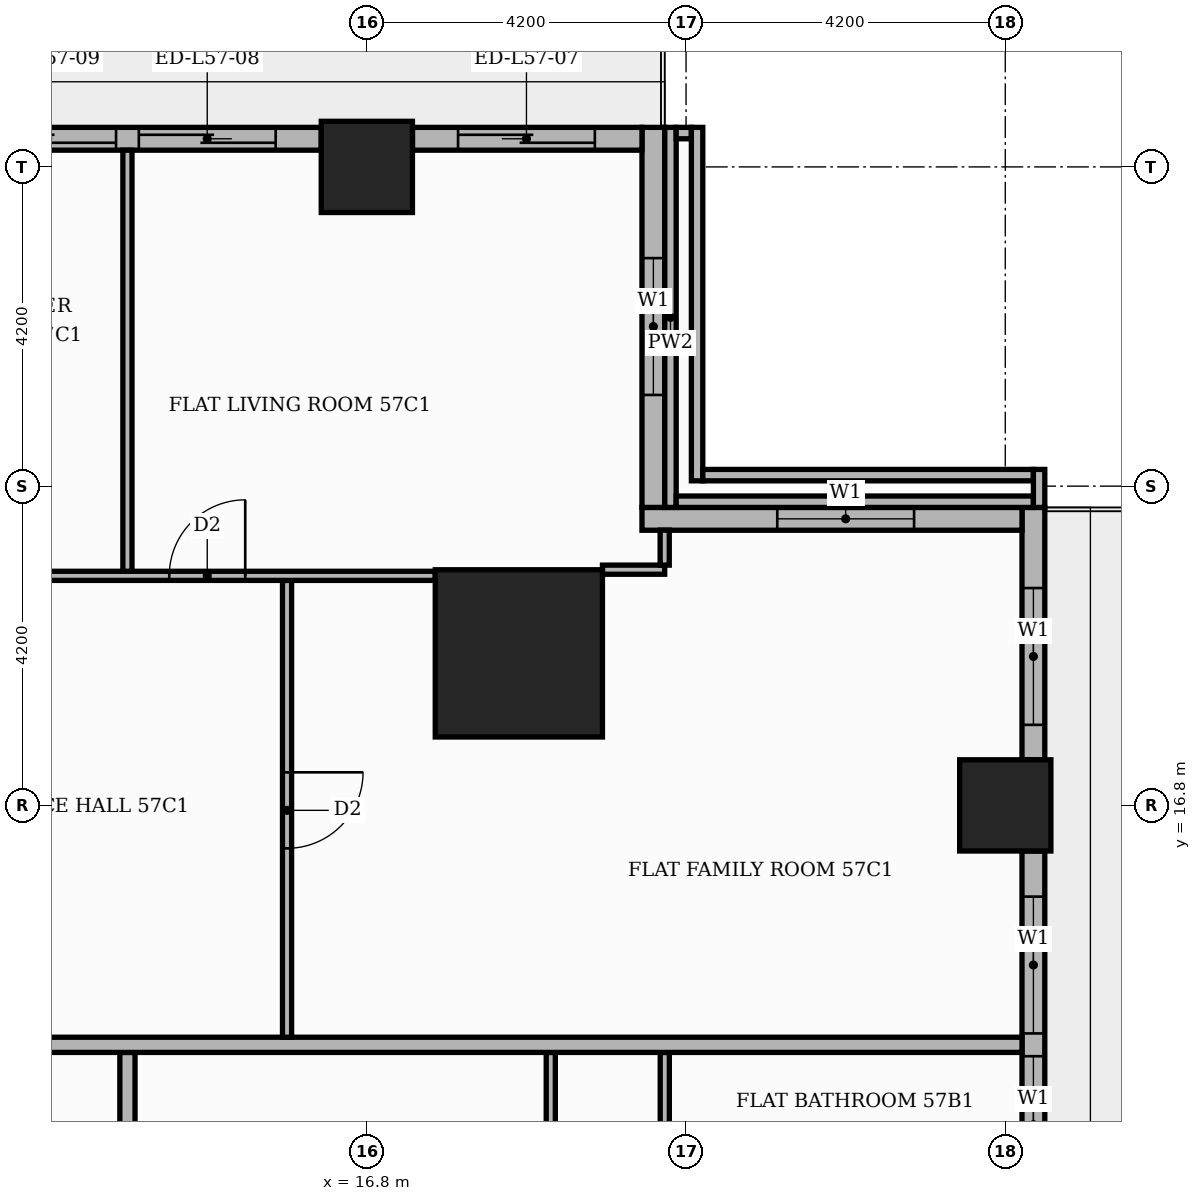
"""IFC4 building model, lengths in metres.
Left out: names, types, materials, properties, quantities, classifications, styles, units other than length and angle.
Written with IfcOpenShell. Run it as: python <this file> out.ifc"""

import sys

from ifc_helpers import new_model, si_unit, direction, frame, frame_2d, origin, origin_2d, place, context, subcontext, project, spatial, rectangle, extrude, element, fill, save


model = new_model("IFC4")
c1 = context("Model", 3, precision=1e-05, world=origin(), true_north=direction((0.0, 1.0)))
c2 = subcontext(c1, "Body", "Model", "MODEL_VIEW")
j1 = project(units=[si_unit("LENGTHUNIT", "METRE"), si_unit("PLANEANGLEUNIT", "RADIAN")], contexts=[c1])
p1 = place(None, origin())
s1 = spatial("IfcSite", under=j1, at=p1, CompositionType="ELEMENT")
p2 = place(p1, origin())
s2 = spatial("IfcBuilding", under=s1, at=p2, CompositionType="ELEMENT")
p3 = place(p2, frame((0.0, 0.0, 240.6)))
s3 = spatial("IfcBuildingStorey", under=s2, at=p3, CompositionType="ELEMENT", Elevation=240.6)
p4 = place(p3, frame((18.8, 18.8, 0.0), z_axis=(0.0, 0.0, 1.0), x_axis=(1.0, 0.0, 0.0)))
e1 = element("IfcColumn", 1, at=p4, inside=s3, PredefinedType="COLUMN", context=c2, shape_type="SweptSolid", body=[
    extrude(rectangle(XDim=2.2, YDim=2.2, at=origin_2d()), origin(), (0.0, 0.0, 1.0), 3.9),
])
for number, where, z_axis, x_axis in (
    (2, (25.2, 16.8, 0.0), (0.0, 0.0, 1.0), (1.0, 0.0, 0.0)),
    (3, (16.8, 25.2, 0.0), (0.0, 0.0, 1.0), (1.0, 0.0, 0.0)),
):
    element("IfcColumn", number, at=place(p3, frame(where, z_axis=z_axis, x_axis=x_axis)), inside=s3, PredefinedType="COLUMN", context=c2, shape_type="SweptSolid", body=[
        extrude(rectangle(XDim=1.2, YDim=1.2, at=origin_2d()), origin(), (0.0, 0.0, 1.0), 3.9),
    ])
p5 = place(p3, frame((25.57, 9.0, 0.0), z_axis=(0.0, 0.0, 1.0), x_axis=(0.0, 1.0, 0.0)))
e4 = element("IfcWall", 4, at=p5, inside=s3, PredefinedType="STANDARD", context=c2, shape_type="SweptSolid", body=[
    extrude(rectangle(XDim=7.2, YDim=0.3, at=frame_2d((3.6, 0.0))), origin(), (0.0, 0.0, 1.0), 3.48),
])
p6 = place(p5, frame((0.6, 0.0, 0.9)))
e5 = element("IfcOpeningElement", 5, at=p6, cuts=e4, PredefinedType="OPENING", context=c2, shape_type="SweptSolid", body=[
    extrude(rectangle(XDim=1.8, YDim=2.1, at=frame_2d((0.9, 1.05))), frame((0.0, 0.16, 0.0), z_axis=(0.0, -1.0, 0.0), x_axis=(1.0, 0.0, 0.0)), (0.0, 0.0, 1.0), 0.32),
])
p7 = place(p5, frame((2.7, 0.0, 0.9)))
e6 = element("IfcOpeningElement", 6, at=p7, cuts=e4, PredefinedType="OPENING", context=c2, shape_type="SweptSolid", body=[
    extrude(rectangle(XDim=1.8, YDim=2.1, at=frame_2d((0.9, 1.05))), frame((0.0, 0.16, 0.0), z_axis=(0.0, -1.0, 0.0), x_axis=(1.0, 0.0, 0.0)), (0.0, 0.0, 1.0), 0.32),
])
p8 = place(p5, frame((4.8, 0.0, 0.9)))
e7 = element("IfcOpeningElement", 7, at=p8, cuts=e4, PredefinedType="OPENING", context=c2, shape_type="SweptSolid", body=[
    extrude(rectangle(XDim=1.8, YDim=2.1, at=frame_2d((0.9, 1.05))), frame((0.0, 0.16, 0.0), z_axis=(0.0, -1.0, 0.0), x_axis=(1.0, 0.0, 0.0)), (0.0, 0.0, 1.0), 0.32),
])
p9 = place(p3, frame((25.57, 17.4, 0.0), z_axis=(0.0, 0.0, 1.0), x_axis=(0.0, 1.0, 0.0)))
e8 = element("IfcWall", 8, at=p9, inside=s3, PredefinedType="STANDARD", context=c2, shape_type="SweptSolid", body=[
    extrude(rectangle(XDim=3.32, YDim=0.3, at=frame_2d((1.66, 0.0))), origin(), (0.0, 0.0, 1.0), 3.48),
])
p10 = place(p9, frame((0.459, 0.0, 0.9)))
e9 = element("IfcOpeningElement", 9, at=p10, cuts=e8, PredefinedType="OPENING", context=c2, shape_type="SweptSolid", body=[
    extrude(rectangle(XDim=1.8, YDim=2.1, at=frame_2d((0.9, 1.05))), frame((0.0, 0.16, 0.0), z_axis=(0.0, -1.0, 0.0), x_axis=(1.0, 0.0, 0.0)), (0.0, 0.0, 1.0), 0.32),
])
p11 = place(p3, frame((25.42, 20.57, 0.0), z_axis=(0.0, 0.0, 1.0), x_axis=(-1.0, 0.0, 0.0)))
e10 = element("IfcWall", 10, at=p11, inside=s3, PredefinedType="STANDARD", context=c2, shape_type="SweptSolid", body=[
    extrude(rectangle(XDim=5.0, YDim=0.3, at=frame_2d((2.5, 0.0))), origin(), (0.0, 0.0, 1.0), 3.48),
])
p12 = place(p11, frame((1.42, 0.0, 0.9)))
e11 = element("IfcOpeningElement", 11, at=p12, cuts=e10, PredefinedType="OPENING", context=c2, shape_type="SweptSolid", body=[
    extrude(rectangle(XDim=1.8, YDim=2.1, at=frame_2d((0.9, 1.05))), frame((0.0, 0.16, 0.0), z_axis=(0.0, -1.0, 0.0), x_axis=(1.0, 0.0, 0.0)), (0.0, 0.0, 1.0), 0.32),
])
p13 = place(p3, frame((20.57, 20.72, 0.0), z_axis=(0.0, 0.0, 1.0), x_axis=(0.0, 1.0, 0.0)))
e12 = element("IfcWall", 12, at=p13, inside=s3, PredefinedType="STANDARD", context=c2, shape_type="SweptSolid", body=[
    extrude(rectangle(XDim=5.0, YDim=0.3, at=frame_2d((2.5, 0.0))), origin(), (0.0, 0.0, 1.0), 3.48),
])
p14 = place(p13, frame((1.48, 0.0, 0.9)))
e13 = element("IfcOpeningElement", 13, at=p14, cuts=e12, PredefinedType="OPENING", context=c2, shape_type="SweptSolid", body=[
    extrude(rectangle(XDim=1.8, YDim=2.1, at=frame_2d((0.9, 1.05))), frame((0.0, 0.16, 0.0), z_axis=(0.0, -1.0, 0.0), x_axis=(1.0, 0.0, 0.0)), (0.0, 0.0, 1.0), 0.32),
])
p15 = place(p3, frame((20.42, 25.57, 0.0), z_axis=(0.0, 0.0, 1.0), x_axis=(-1.0, 0.0, 0.0)))
e14 = element("IfcWall", 14, at=p15, inside=s3, PredefinedType="STANDARD", context=c2, shape_type="SweptSolid", body=[
    extrude(rectangle(XDim=3.02, YDim=0.3, at=frame_2d((1.51, 0.0))), origin(), (0.0, 0.0, 1.0), 3.48),
])
p16 = place(p15, frame((0.62, 0.0, 0.0)))
e15 = element("IfcOpeningElement", 15, at=p16, cuts=e14, PredefinedType="OPENING", context=c2, shape_type="SweptSolid", body=[
    extrude(rectangle(XDim=1.8, YDim=2.4, at=frame_2d((0.9, 1.2))), frame((0.0, 0.16, 0.0), z_axis=(0.0, -1.0, 0.0), x_axis=(1.0, 0.0, 0.0)), (0.0, 0.0, 1.0), 0.32),
])
p17 = place(p3, frame((16.2, 25.57, 0.0), z_axis=(0.0, 0.0, 1.0), x_axis=(-1.0, 0.0, 0.0)))
e16 = element("IfcWall", 16, at=p17, inside=s3, PredefinedType="STANDARD", context=c2, shape_type="SweptSolid", body=[
    extrude(rectangle(XDim=7.2, YDim=0.3, at=frame_2d((3.6, 0.0))), origin(), (0.0, 0.0, 1.0), 3.48),
])
p18 = place(p17, frame((0.6, 0.0, 0.0)))
e17 = element("IfcOpeningElement", 17, at=p18, cuts=e16, PredefinedType="OPENING", context=c2, shape_type="SweptSolid", body=[
    extrude(rectangle(XDim=1.8, YDim=2.4, at=frame_2d((0.9, 1.2))), frame((0.0, 0.16, 0.0), z_axis=(0.0, -1.0, 0.0), x_axis=(1.0, 0.0, 0.0)), (0.0, 0.0, 1.0), 0.32),
])
p19 = place(p17, frame((2.7, 0.0, 0.0)))
e18 = element("IfcOpeningElement", 18, at=p19, cuts=e16, PredefinedType="OPENING", context=c2, shape_type="SweptSolid", body=[
    extrude(rectangle(XDim=1.8, YDim=2.4, at=frame_2d((0.9, 1.2))), frame((0.0, 0.16, 0.0), z_axis=(0.0, -1.0, 0.0), x_axis=(1.0, 0.0, 0.0)), (0.0, 0.0, 1.0), 0.32),
])
p20 = place(p17, frame((4.8, 0.0, 0.9)))
e19 = element("IfcOpeningElement", 19, at=p20, cuts=e16, PredefinedType="OPENING", context=c2, shape_type="SweptSolid", body=[
    extrude(rectangle(XDim=1.8, YDim=2.1, at=frame_2d((0.9, 1.05))), frame((0.0, 0.16, 0.0), z_axis=(0.0, -1.0, 0.0), x_axis=(1.0, 0.0, 0.0)), (0.0, 0.0, 1.0), 0.32),
])
p21 = place(p3, frame((20.795, 20.72, 0.0), z_axis=(0.0, 0.0, 1.0), x_axis=(0.0, 1.0, 0.0)))
e20 = element("IfcWall", 20, at=p21, inside=s3, PredefinedType="PARAPET", context=c2, shape_type="SweptSolid", body=[
    extrude(rectangle(XDim=5.0, YDim=0.15, at=frame_2d((2.5, 0.0))), origin(), (0.0, 0.0, 1.0), 1.1),
])
p22 = place(p3, frame((20.87, 25.645, 0.0), z_axis=(0.0, 0.0, 1.0), x_axis=(1.0, 0.0, 0.0)))
e21 = element("IfcWall", 21, at=p22, inside=s3, PredefinedType="PARAPET", context=c2, shape_type="SweptSolid", body=[
    extrude(rectangle(XDim=0.2, YDim=0.15, at=frame_2d((0.1, 0.0))), origin(), (0.0, 0.0, 1.0), 1.1),
])
p23 = place(p3, frame((20.87, 20.795, 0.0), z_axis=(0.0, 0.0, 1.0), x_axis=(1.0, 0.0, 0.0)))
e22 = element("IfcWall", 22, at=p23, inside=s3, PredefinedType="PARAPET", context=c2, shape_type="SweptSolid", body=[
    extrude(rectangle(XDim=4.7, YDim=0.15, at=frame_2d((2.35, 0.0))), origin(), (0.0, 0.0, 1.0), 1.1),
])
p24 = place(p3, frame((21.145, 21.07, 0.0), z_axis=(0.0, 0.0, 1.0), x_axis=(0.0, 1.0, 0.0)))
e23 = element("IfcWall", 23, at=p24, inside=s3, PredefinedType="PARAPET", context=c2, shape_type="SweptSolid", body=[
    extrude(rectangle(XDim=4.65, YDim=0.15, at=frame_2d((2.325, 0.0))), origin(), (0.0, 0.0, 1.0), 1.1),
])
p25 = place(p3, frame((21.22, 21.145, 0.0), z_axis=(0.0, 0.0, 1.0), x_axis=(1.0, 0.0, 0.0)))
e24 = element("IfcWall", 24, at=p25, inside=s3, PredefinedType="PARAPET", context=c2, shape_type="SweptSolid", body=[
    extrude(rectangle(XDim=4.35, YDim=0.15, at=frame_2d((2.175, 0.0))), origin(), (0.0, 0.0, 1.0), 1.1),
])
p26 = place(p3, frame((25.645, 20.72, 0.0), z_axis=(0.0, 0.0, 1.0), x_axis=(0.0, 1.0, 0.0)))
e25 = element("IfcWall", 25, at=p26, inside=s3, PredefinedType="PARAPET", context=c2, shape_type="SweptSolid", body=[
    extrude(rectangle(XDim=0.5, YDim=0.15, at=frame_2d((0.25, 0.0))), origin(), (0.0, 0.0, 1.0), 1.1),
])
p27 = place(p3, frame((19.22, 9.36, 0.0), z_axis=(0.0, 0.0, 1.0), x_axis=(0.0, 1.0, 0.0)))
e26 = element("IfcWall", 26, at=p27, inside=s3, PredefinedType="PARTITIONING", context=c2, shape_type="SweptSolid", body=[
    extrude(rectangle(XDim=4.19, YDim=0.12, at=frame_2d((2.095, 0.0))), origin(), (0.0, 0.0, 1.0), 3.48),
])
p28 = place(p27, frame((1.665, 0.0, 0.0)))
e27 = element("IfcOpeningElement", 27, at=p28, cuts=e26, PredefinedType="OPENING", context=c2, shape_type="SweptSolid", body=[
    extrude(rectangle(XDim=0.9, YDim=2.1, at=frame_2d((0.45, 1.05))), frame((0.0, 0.07, 0.0), z_axis=(0.0, -1.0, 0.0), x_axis=(1.0, 0.0, 0.0)), (0.0, 0.0, 1.0), 0.14),
])
p29 = place(p3, frame((13.65, 11.1, 0.0), z_axis=(0.0, 0.0, 1.0), x_axis=(0.0, 1.0, 0.0)))
e28 = element("IfcWall", 28, at=p29, inside=s3, PredefinedType="PARTITIONING", context=c2, shape_type="SweptSolid", body=[
    extrude(rectangle(XDim=2.45, YDim=0.2, at=frame_2d((1.225, 0.0))), origin(), (0.0, 0.0, 1.0), 3.48),
])
p30 = place(p3, frame((20.72, 11.61, 0.0), z_axis=(0.0, 0.0, 1.0), x_axis=(0.0, 1.0, 0.0)))
e29 = element("IfcWall", 29, at=p30, inside=s3, PredefinedType="PARTITIONING", context=c2, shape_type="SweptSolid", body=[
    extrude(rectangle(XDim=1.94, YDim=0.12, at=frame_2d((0.97, 0.0))), origin(), (0.0, 0.0, 1.0), 3.48),
])
p31 = place(p3, frame((-13.65, 13.65, 0.0), z_axis=(0.0, 0.0, 1.0), x_axis=(1.0, 0.0, 0.0)))
e30 = element("IfcWall", 30, at=p31, inside=s3, PredefinedType="PARTITIONING", context=c2, shape_type="SweptSolid", body=[
    extrude(rectangle(XDim=39.07, YDim=0.2, at=frame_2d((19.535, 0.0))), origin(), (0.0, 0.0, 1.0), 3.48),
])
p32 = place(p31, frame((24.65, 0.0, 0.0)))
e31 = element("IfcOpeningElement", 31, at=p32, cuts=e30, PredefinedType="OPENING", context=c2, shape_type="SweptSolid", body=[
    extrude(rectangle(XDim=1.1, YDim=2.4, at=frame_2d((0.55, 1.2))), frame((0.0, 0.11, 0.0), z_axis=(0.0, -1.0, 0.0), x_axis=(1.0, 0.0, 0.0)), (0.0, 0.0, 1.0), 0.22),
])
p33 = place(p31, frame((12.05, 0.0, 0.0)))
e32 = element("IfcOpeningElement", 32, at=p33, cuts=e30, PredefinedType="OPENING", context=c2, shape_type="SweptSolid", body=[
    extrude(rectangle(XDim=1.1, YDim=2.4, at=frame_2d((0.55, 1.2))), frame((0.0, 0.11, 0.0), z_axis=(0.0, -1.0, 0.0), x_axis=(1.0, 0.0, 0.0)), (0.0, 0.0, 1.0), 0.22),
])
p34 = place(p3, frame((15.75, 13.75, 0.0), z_axis=(0.0, 0.0, 1.0), x_axis=(0.0, 1.0, 0.0)))
e33 = element("IfcWall", 33, at=p34, inside=s3, PredefinedType="PARTITIONING", context=c2, shape_type="SweptSolid", body=[
    extrude(rectangle(XDim=6.01, YDim=0.12, at=frame_2d((3.005, 0.0))), origin(), (0.0, 0.0, 1.0), 3.48),
])
p35 = place(p34, frame((2.485, 0.0, 0.0)))
e34 = element("IfcOpeningElement", 34, at=p35, cuts=e33, PredefinedType="OPENING", context=c2, shape_type="SweptSolid", body=[
    extrude(rectangle(XDim=1.0, YDim=2.1, at=frame_2d((0.5, 1.05))), frame((0.0, 0.07, 0.0), z_axis=(0.0, -1.0, 0.0), x_axis=(1.0, 0.0, 0.0)), (0.0, 0.0, 1.0), 0.14),
])
p36 = place(p3, frame((5.35, 19.82, 0.0), z_axis=(0.0, 0.0, 1.0), x_axis=(1.0, 0.0, 0.0)))
e35 = element("IfcWall", 35, at=p36, inside=s3, PredefinedType="PARTITIONING", context=c2, shape_type="SweptSolid", body=[
    extrude(rectangle(XDim=12.35, YDim=0.12, at=frame_2d((6.175, 0.0))), origin(), (0.0, 0.0, 1.0), 3.48),
])
p37 = place(p36, frame((8.85, 0.0, 0.0)))
e36 = element("IfcOpeningElement", 36, at=p37, cuts=e35, PredefinedType="OPENING", context=c2, shape_type="SweptSolid", body=[
    extrude(rectangle(XDim=1.0, YDim=2.1, at=frame_2d((0.5, 1.05))), frame((0.0, 0.07, 0.0), z_axis=(0.0, -1.0, 0.0), x_axis=(1.0, 0.0, 0.0)), (0.0, 0.0, 1.0), 0.14),
])
p38 = place(p36, frame((5.75, 0.0, 0.0)))
e37 = element("IfcOpeningElement", 37, at=p38, cuts=e35, PredefinedType="OPENING", context=c2, shape_type="SweptSolid", body=[
    extrude(rectangle(XDim=0.9, YDim=2.1, at=frame_2d((0.45, 1.05))), frame((0.0, 0.07, 0.0), z_axis=(0.0, -1.0, 0.0), x_axis=(1.0, 0.0, 0.0)), (0.0, 0.0, 1.0), 0.14),
])
p39 = place(p3, frame((13.65, 19.88, 0.0), z_axis=(0.0, 0.0, 1.0), x_axis=(0.0, 1.0, 0.0)))
e38 = element("IfcWall", 38, at=p39, inside=s3, PredefinedType="PARTITIONING", context=c2, shape_type="SweptSolid", body=[
    extrude(rectangle(XDim=5.54, YDim=0.12, at=frame_2d((2.77, 0.0))), origin(), (0.0, 0.0, 1.0), 3.48),
])
p40 = place(p3, frame((19.9, 19.901, 0.0), z_axis=(0.0, 0.0, 1.0), x_axis=(1.0, 0.0, 0.0)))
e39 = element("IfcWall", 39, at=p40, inside=s3, PredefinedType="PARTITIONING", context=c2, shape_type="SweptSolid", body=[
    extrude(rectangle(XDim=0.819, YDim=0.12, at=frame_2d((0.41, 0.0))), origin(), (0.0, 0.0, 1.0), 3.48),
])
p41 = place(p3, frame((20.719, 19.961, 0.0), z_axis=(0.0, 0.0, 1.0), x_axis=(0.0, 1.0, 0.0)))
e40 = element("IfcWall", 40, at=p41, inside=s3, PredefinedType="PARTITIONING", context=c2, shape_type="SweptSolid", body=[
    extrude(rectangle(XDim=0.46, YDim=0.12, at=frame_2d((0.23, 0.0))), origin(), (0.0, 0.0, 1.0), 3.48),
])
p42 = place(p7, origin())
e41 = element("IfcWindow", 41, at=p42, inside=s3, PartitioningType="SINGLE_PANEL", PredefinedType="WINDOW", context=c2, shape_type="SweptSolid", body=[
    extrude(rectangle(XDim=1.8, YDim=2.1, at=frame_2d((0.9, 1.05))), frame((0.0, 0.03, 0.0), z_axis=(0.0, -1.0, 0.0), x_axis=(1.0, 0.0, 0.0)), (0.0, 0.0, 1.0), 0.06),
])
fill(e6, e41)
p43 = place(p8, origin())
e42 = element("IfcWindow", 42, at=p43, inside=s3, PartitioningType="SINGLE_PANEL", PredefinedType="WINDOW", context=c2, shape_type="SweptSolid", body=[
    extrude(rectangle(XDim=1.8, YDim=2.1, at=frame_2d((0.9, 1.05))), frame((0.0, 0.03, 0.0), z_axis=(0.0, -1.0, 0.0), x_axis=(1.0, 0.0, 0.0)), (0.0, 0.0, 1.0), 0.06),
])
fill(e7, e42)
p44 = place(p10, origin())
e43 = element("IfcWindow", 43, at=p44, inside=s3, PartitioningType="SINGLE_PANEL", PredefinedType="WINDOW", context=c2, shape_type="SweptSolid", body=[
    extrude(rectangle(XDim=1.8, YDim=2.1, at=frame_2d((0.9, 1.05))), frame((0.0, 0.03, 0.0), z_axis=(0.0, -1.0, 0.0), x_axis=(1.0, 0.0, 0.0)), (0.0, 0.0, 1.0), 0.06),
])
fill(e9, e43)
p45 = place(p12, origin())
e44 = element("IfcWindow", 44, at=p45, inside=s3, PartitioningType="SINGLE_PANEL", PredefinedType="WINDOW", context=c2, shape_type="SweptSolid", body=[
    extrude(rectangle(XDim=1.8, YDim=2.1, at=frame_2d((0.9, 1.05))), frame((0.0, 0.03, 0.0), z_axis=(0.0, -1.0, 0.0), x_axis=(1.0, 0.0, 0.0)), (0.0, 0.0, 1.0), 0.06),
])
fill(e11, e44)
p46 = place(p14, origin())
e45 = element("IfcWindow", 45, at=p46, inside=s3, PartitioningType="SINGLE_PANEL", PredefinedType="WINDOW", context=c2, shape_type="SweptSolid", body=[
    extrude(rectangle(XDim=1.8, YDim=2.1, at=frame_2d((0.9, 1.05))), frame((0.0, 0.03, 0.0), z_axis=(0.0, -1.0, 0.0), x_axis=(1.0, 0.0, 0.0)), (0.0, 0.0, 1.0), 0.06),
])
fill(e13, e45)
p47 = place(p16, origin())
e46 = element("IfcDoor", 46, at=p47, inside=s3, OperationType="SLIDING_TO_RIGHT", PredefinedType="DOOR", context=c2, shape_type="SweptSolid", body=[
    extrude(rectangle(XDim=1.8, YDim=2.4, at=frame_2d((0.9, 1.2))), frame((0.0, 0.025, 0.0), z_axis=(0.0, -1.0, 0.0), x_axis=(1.0, 0.0, 0.0)), (0.0, 0.0, 1.0), 0.05),
])
fill(e15, e46)
p48 = place(p18, origin())
e47 = element("IfcDoor", 47, at=p48, inside=s3, OperationType="SLIDING_TO_LEFT", PredefinedType="DOOR", context=c2, shape_type="SweptSolid", body=[
    extrude(rectangle(XDim=1.8, YDim=2.4, at=frame_2d((0.9, 1.2))), frame((0.0, 0.025, 0.0), z_axis=(0.0, -1.0, 0.0), x_axis=(1.0, 0.0, 0.0)), (0.0, 0.0, 1.0), 0.05),
])
fill(e17, e47)
p49 = place(p19, origin())
e48 = element("IfcDoor", 48, at=p49, inside=s3, OperationType="SLIDING_TO_RIGHT", PredefinedType="DOOR", context=c2, shape_type="SweptSolid", body=[
    extrude(rectangle(XDim=1.8, YDim=2.4, at=frame_2d((0.9, 1.2))), frame((0.0, 0.025, 0.0), z_axis=(0.0, -1.0, 0.0), x_axis=(1.0, 0.0, 0.0)), (0.0, 0.0, 1.0), 0.05),
])
fill(e18, e48)
p50 = place(p35, frame((1.0, 0.0, 0.0), z_axis=(0.0, 0.0, 1.0), x_axis=(-1.0, 0.0, 0.0)))
e49 = element("IfcDoor", 49, at=p50, inside=s3, OperationType="SINGLE_SWING_RIGHT", PredefinedType="DOOR", context=c2, shape_type="SweptSolid", body=[
    extrude(rectangle(XDim=1.0, YDim=2.1, at=frame_2d((0.5, 1.05))), frame((0.0, 0.025, 0.0), z_axis=(0.0, -1.0, 0.0), x_axis=(1.0, 0.0, 0.0)), (0.0, 0.0, 1.0), 0.05),
])
fill(e34, e49)
p51 = place(p37, origin())
e50 = element("IfcDoor", 50, at=p51, inside=s3, OperationType="SINGLE_SWING_RIGHT", PredefinedType="DOOR", context=c2, shape_type="SweptSolid", body=[
    extrude(rectangle(XDim=1.0, YDim=2.1, at=frame_2d((0.5, 1.05))), frame((0.0, 0.025, 0.0), z_axis=(0.0, -1.0, 0.0), x_axis=(1.0, 0.0, 0.0)), (0.0, 0.0, 1.0), 0.05),
])
fill(e36, e50)
save(model, sys.argv[1])
